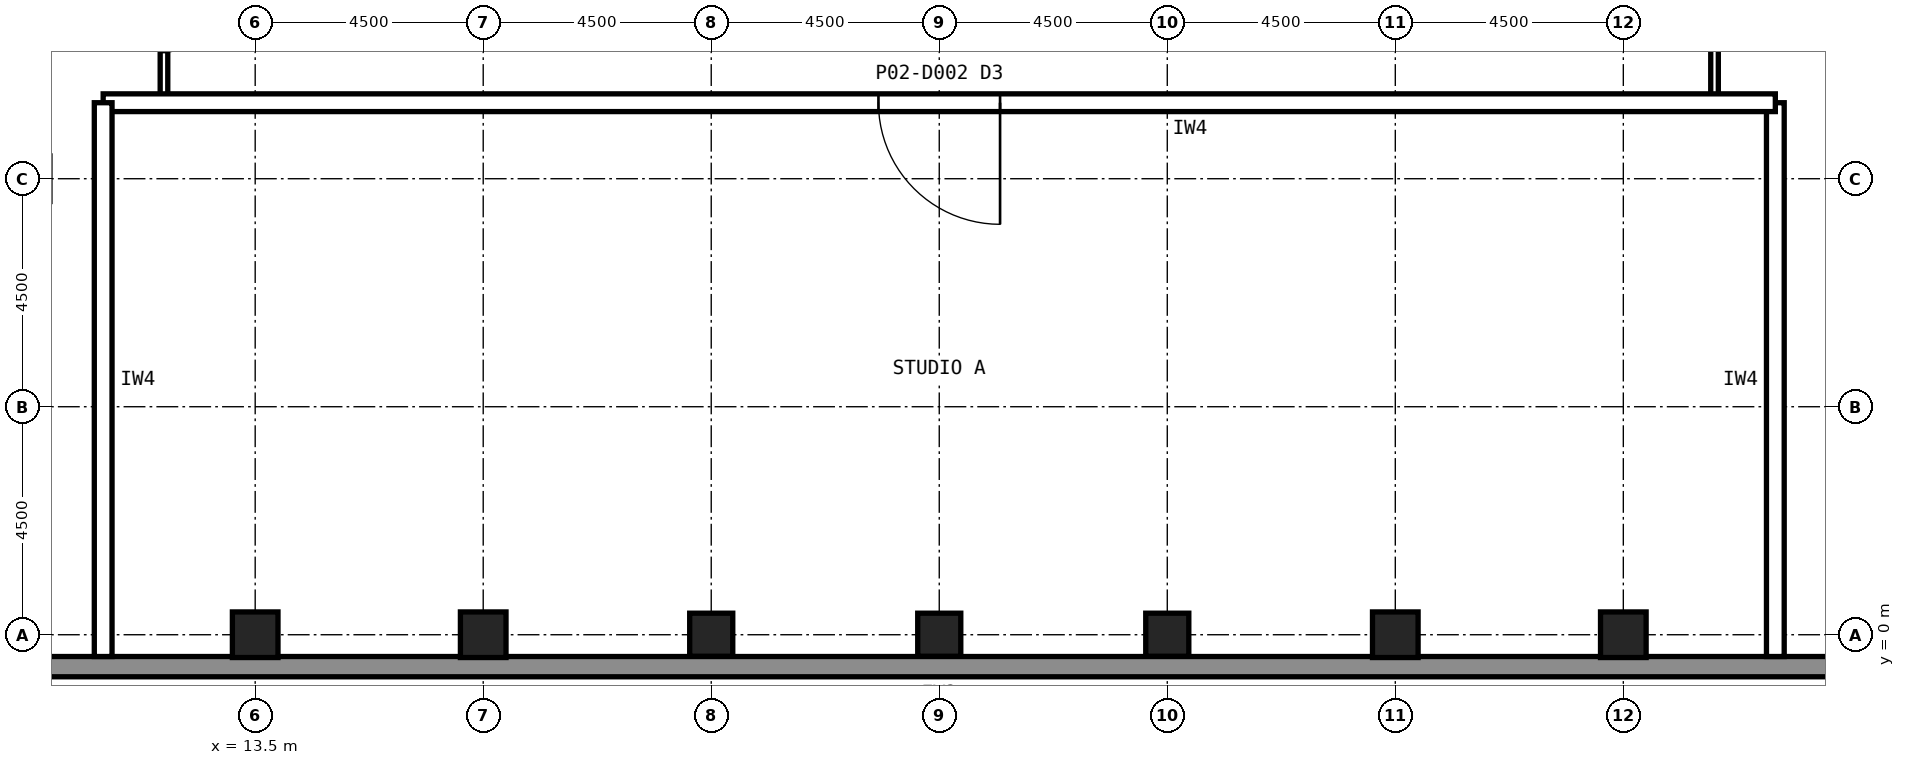
"""IFC4 building model, lengths in metres.
Left out: names, types, materials, properties, quantities, classifications, styles, units other than length and angle.
Written with IfcOpenShell. Run it as: python <this file> out.ifc"""

import sys

from ifc_helpers import new_model, si_unit, direction, frame, frame_2d, origin, origin_2d, place, context, subcontext, project, spatial, rectangle, hollow_rectangle, extrude, element, fill, save


model = new_model("IFC4")
c1 = context("Model", 3, precision=1e-05, world=origin(), true_north=direction((0.0, 1.0)))
c2 = subcontext(c1, "Body", "Model", "MODEL_VIEW")
j1 = project(units=[si_unit("LENGTHUNIT", "METRE"), si_unit("PLANEANGLEUNIT", "RADIAN")], contexts=[c1])
p1 = place(None, origin())
s1 = spatial("IfcSite", under=j1, at=p1, CompositionType="ELEMENT")
p2 = place(p1, origin())
s2 = spatial("IfcBuilding", under=s1, at=p2, CompositionType="ELEMENT")
p3 = place(p2, frame((0.0, 0.0, 6.0)))
s3 = spatial("IfcBuildingStorey", under=s2, at=p3, CompositionType="ELEMENT", Elevation=6.0)
for number, where, z_axis, x_axis in (
    (1, (13.5, 0.0, 0.0), (0.0, 0.0, 1.0), (1.0, 0.0, 0.0)),
    (2, (18.0, 0.0, 0.0), (0.0, 0.0, 1.0), (1.0, 0.0, 0.0)),
):
    element("IfcColumn", number, at=place(p3, frame(where, z_axis=z_axis, x_axis=x_axis)), inside=s3, PredefinedType="COLUMN", context=c2, shape_type="SweptSolid", body=[
        extrude(hollow_rectangle(XDim=0.9, YDim=0.9, WallThickness=0.063, at=origin_2d()), origin(), (0.0, 0.0, 1.0), 6.0),
    ])
for number, where, z_axis, x_axis in (
    (3, (22.5, 0.0, 0.0), (0.0, 0.0, 1.0), (1.0, 0.0, 0.0)),
    (4, (27.0, 0.0, 0.0), (0.0, 0.0, 1.0), (1.0, 0.0, 0.0)),
    (5, (31.5, 0.0, 0.0), (0.0, 0.0, 1.0), (1.0, 0.0, 0.0)),
):
    element("IfcColumn", number, at=place(p3, frame(where, z_axis=z_axis, x_axis=x_axis)), inside=s3, PredefinedType="COLUMN", context=c2, shape_type="SweptSolid", body=[
        extrude(hollow_rectangle(XDim=0.85, YDim=0.85, WallThickness=0.05, at=origin_2d()), origin(), (0.0, 0.0, 1.0), 6.0),
    ])
for number, where, z_axis, x_axis in (
    (6, (36.0, 0.0, 0.0), (0.0, 0.0, 1.0), (1.0, 0.0, 0.0)),
    (7, (40.5, 0.0, 0.0), (0.0, 0.0, 1.0), (1.0, 0.0, 0.0)),
):
    element("IfcColumn", number, at=place(p3, frame(where, z_axis=z_axis, x_axis=x_axis)), inside=s3, PredefinedType="COLUMN", context=c2, shape_type="SweptSolid", body=[
        extrude(hollow_rectangle(XDim=0.9, YDim=0.9, WallThickness=0.063, at=origin_2d()), origin(), (0.0, 0.0, 1.0), 6.0),
    ])
p4 = place(p3, frame((58.761, -0.63, 0.0), z_axis=(0.0, 0.0, 1.0), x_axis=(-1.0, 0.0, 0.0)))
e8 = element("IfcWall", 8, at=p4, inside=s3, PredefinedType="SOLIDWALL", context=c2, shape_type="SweptSolid", body=[
    extrude(rectangle(XDim=63.522, YDim=0.4, at=frame_2d((31.761, 0.0))), origin(), (0.0, 0.0, 1.0), 6.0),
])
p5 = place(p3, frame((42.3, 10.5, 0.0), z_axis=(0.0, 0.0, 1.0), x_axis=(0.0, 1.0, 0.0)))
e9 = element("IfcWall", 9, at=p5, inside=s3, PredefinedType="PARTITIONING", context=c2, shape_type="SweptSolid", body=[
    extrude(rectangle(XDim=7.5, YDim=0.15, at=frame_2d((3.75, 0.0))), origin(), (0.0, 0.0, 1.0), 5.8),
])
p6 = place(p5, frame((3.25, 0.0, 0.0)))
e10 = element("IfcOpeningElement", 10, at=p6, cuts=e9, PredefinedType="OPENING", context=c2, shape_type="SweptSolid", body=[
    extrude(rectangle(XDim=1.0, YDim=2.1, at=frame_2d((0.5, 1.05))), frame((0.0, 0.085, 0.0), z_axis=(0.0, -1.0, 0.0), x_axis=(1.0, 0.0, 0.0)), (0.0, 0.0, 1.0), 0.17),
])
p7 = place(p3, frame((11.7, 13.5, 0.0), z_axis=(0.0, 0.0, 1.0), x_axis=(0.0, -1.0, 0.0)))
e11 = element("IfcWall", 11, at=p7, inside=s3, PredefinedType="PARTITIONING", context=c2, shape_type="SweptSolid", body=[
    extrude(rectangle(XDim=3.0, YDim=0.15, at=frame_2d((1.5, 0.0))), origin(), (0.0, 0.0, 1.0), 5.8),
])
p8 = place(p7, frame((1.0, 0.0, 0.0)))
e12 = element("IfcOpeningElement", 12, at=p8, cuts=e11, PredefinedType="OPENING", context=c2, shape_type="SweptSolid", body=[
    extrude(rectangle(XDim=1.0, YDim=2.1, at=frame_2d((0.5, 1.05))), frame((0.0, 0.085, 0.0), z_axis=(0.0, -1.0, 0.0), x_axis=(1.0, 0.0, 0.0)), (0.0, 0.0, 1.0), 0.17),
])
p9 = place(p3, frame((43.5, -0.43, 0.0), z_axis=(0.0, 0.0, 1.0), x_axis=(0.0, 1.0, 0.0)))
e13 = element("IfcWall", 13, at=p9, inside=s3, PredefinedType="PARTITIONING", context=c2, shape_type="SweptSolid", body=[
    extrude(rectangle(XDim=10.93, YDim=0.35, at=frame_2d((5.465, 0.0))), origin(), (0.0, 0.0, 1.0), 5.8),
])
p10 = place(p3, frame((43.5, 10.5, 0.0), z_axis=(0.0, 0.0, 1.0), x_axis=(-1.0, 0.0, 0.0)))
e14 = element("IfcWall", 14, at=p10, inside=s3, PredefinedType="PARTITIONING", context=c2, shape_type="SweptSolid", body=[
    extrude(rectangle(XDim=33.0, YDim=0.35, at=frame_2d((16.5, 0.0))), origin(), (0.0, 0.0, 1.0), 5.8),
])
p11 = place(p10, frame((15.3, 0.0, 0.0)))
e15 = element("IfcOpeningElement", 15, at=p11, cuts=e14, PredefinedType="OPENING", context=c2, shape_type="SweptSolid", body=[
    extrude(rectangle(XDim=2.4, YDim=3.0, at=frame_2d((1.2, 1.5))), frame((0.0, 0.185, 0.0), z_axis=(0.0, -1.0, 0.0), x_axis=(1.0, 0.0, 0.0)), (0.0, 0.0, 1.0), 0.37),
])
p12 = place(p3, frame((10.5, 10.5, 0.0), z_axis=(0.0, 0.0, 1.0), x_axis=(0.0, -1.0, 0.0)))
e16 = element("IfcWall", 16, at=p12, inside=s3, PredefinedType="PARTITIONING", context=c2, shape_type="SweptSolid", body=[
    extrude(rectangle(XDim=10.93, YDim=0.35, at=frame_2d((5.465, 0.0))), origin(), (0.0, 0.0, 1.0), 5.8),
])
p13 = place(p11, origin())
e17 = element("IfcDoor", 17, at=p13, inside=s3, OperationType="SINGLE_SWING_LEFT", PredefinedType="DOOR", context=c2, shape_type="SweptSolid", body=[
    extrude(rectangle(XDim=2.4, YDim=3.0, at=frame_2d((1.2, 1.5))), frame((0.0, 0.025, 0.0), z_axis=(0.0, -1.0, 0.0), x_axis=(1.0, 0.0, 0.0)), (0.0, 0.0, 1.0), 0.05),
])
fill(e15, e17)
save(model, sys.argv[1])
